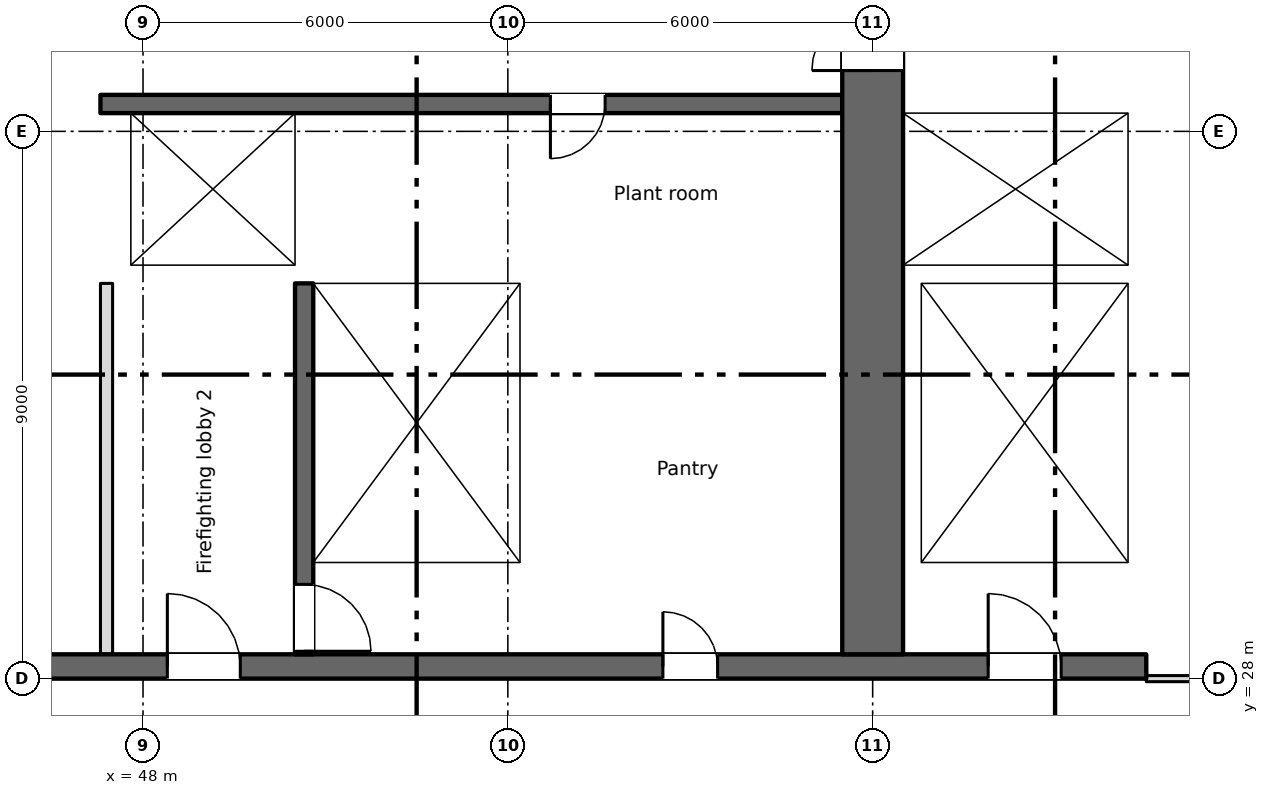
"""IFC4 building model, lengths in metres.
Left out: names, types, materials, properties, quantities, classifications, styles, units other than length and angle.
Written with IfcOpenShell. Run it as: python <this file> out.ifc"""

import sys

from ifc_helpers import new_model, si_unit, direction, frame, frame_2d, origin, place, context, subcontext, project, spatial, rectangle, extrude, element, fill, save


model = new_model("IFC4")
c1 = context("Model", 3, precision=1e-05, world=origin(), true_north=direction((0.0, 1.0)))
c2 = subcontext(c1, "Body", "Model", "MODEL_VIEW")
j1 = project(units=[si_unit("LENGTHUNIT", "METRE"), si_unit("PLANEANGLEUNIT", "RADIAN")], contexts=[c1])
p1 = place(None, origin())
s1 = spatial("IfcSite", under=j1, at=p1, CompositionType="ELEMENT")
p2 = place(p1, origin())
s2 = spatial("IfcBuilding", under=s1, at=p2, CompositionType="ELEMENT")
p3 = place(p2, frame((0.0, 0.0, 22.5)))
s3 = spatial("IfcBuildingStorey", under=s2, at=p3, CompositionType="ELEMENT", Elevation=22.5)
p4 = place(p3, frame((6.7, 28.2, 0.0), z_axis=(0.0, 0.0, 1.0), x_axis=(1.0, 0.0, 0.0)))
e1 = element("IfcWall", 1, at=p4, inside=s3, PredefinedType="SHEAR", context=c2, shape_type="SweptSolid", body=[
    extrude(rectangle(XDim=57.8, YDim=0.4, at=frame_2d((28.9, 0.0))), origin(), (0.0, 0.0, 1.0), 3.35),
])
p5 = place(p4, frame((12.562, 0.0, 0.0)))
e2 = element("IfcOpeningElement", 2, at=p5, cuts=e1, PredefinedType="OPENING", context=c2, shape_type="SweptSolid", body=[
    extrude(rectangle(XDim=0.9, YDim=2.1, at=frame_2d((0.45, 1.05))), frame((0.0, 0.21, 0.0), z_axis=(0.0, -1.0, 0.0), x_axis=(1.0, 0.0, 0.0)), (0.0, 0.0, 1.0), 0.42),
])
p6 = place(p4, frame((15.137, 0.0, 0.0)))
e3 = element("IfcOpeningElement", 3, at=p6, cuts=e1, PredefinedType="OPENING", context=c2, shape_type="SweptSolid", body=[
    extrude(rectangle(XDim=0.9, YDim=2.1, at=frame_2d((0.45, 1.05))), frame((0.0, 0.21, 0.0), z_axis=(0.0, -1.0, 0.0), x_axis=(1.0, 0.0, 0.0)), (0.0, 0.0, 1.0), 0.42),
])
p7 = place(p4, frame((49.85, 0.0, 0.0)))
e4 = element("IfcOpeningElement", 4, at=p7, cuts=e1, PredefinedType="OPENING", context=c2, shape_type="SweptSolid", body=[
    extrude(rectangle(XDim=0.9, YDim=2.1, at=frame_2d((0.45, 1.05))), frame((0.0, 0.21, 0.0), z_axis=(0.0, -1.0, 0.0), x_axis=(1.0, 0.0, 0.0)), (0.0, 0.0, 1.0), 0.42),
])
p8 = place(p4, frame((0.562, 0.0, 0.0)))
e5 = element("IfcOpeningElement", 5, at=p8, cuts=e1, PredefinedType="OPENING", context=c2, shape_type="SweptSolid", body=[
    extrude(rectangle(XDim=0.9, YDim=2.1, at=frame_2d((0.45, 1.05))), frame((0.0, 0.21, 0.0), z_axis=(0.0, -1.0, 0.0), x_axis=(1.0, 0.0, 0.0)), (0.0, 0.0, 1.0), 0.42),
])
p9 = place(p4, frame((2.137, 0.0, 0.0)))
e6 = element("IfcOpeningElement", 6, at=p9, cuts=e1, PredefinedType="OPENING", context=c2, shape_type="SweptSolid", body=[
    extrude(rectangle(XDim=0.9, YDim=2.1, at=frame_2d((0.45, 1.05))), frame((0.0, 0.21, 0.0), z_axis=(0.0, -1.0, 0.0), x_axis=(1.0, 0.0, 0.0)), (0.0, 0.0, 1.0), 0.42),
])
p10 = place(p4, frame((4.7, 0.0, 0.0)))
e7 = element("IfcOpeningElement", 7, at=p10, cuts=e1, PredefinedType="OPENING", context=c2, shape_type="SweptSolid", body=[
    extrude(rectangle(XDim=1.2, YDim=2.1, at=frame_2d((0.6, 1.05))), frame((0.0, 0.21, 0.0), z_axis=(0.0, -1.0, 0.0), x_axis=(1.0, 0.0, 0.0)), (0.0, 0.0, 1.0), 0.42),
])
p11 = place(p4, frame((31.7, 0.0, 0.0)))
e8 = element("IfcOpeningElement", 8, at=p11, cuts=e1, PredefinedType="OPENING", context=c2, shape_type="SweptSolid", body=[
    extrude(rectangle(XDim=1.2, YDim=2.1, at=frame_2d((0.6, 1.05))), frame((0.0, 0.21, 0.0), z_axis=(0.0, -1.0, 0.0), x_axis=(1.0, 0.0, 0.0)), (0.0, 0.0, 1.0), 0.42),
])
p12 = place(p4, frame((55.2, 0.0, 0.0)))
e9 = element("IfcOpeningElement", 9, at=p12, cuts=e1, PredefinedType="OPENING", context=c2, shape_type="SweptSolid", body=[
    extrude(rectangle(XDim=1.2, YDim=2.1, at=frame_2d((0.6, 1.05))), frame((0.0, 0.21, 0.0), z_axis=(0.0, -1.0, 0.0), x_axis=(1.0, 0.0, 0.0)), (0.0, 0.0, 1.0), 0.42),
])
p13 = place(p4, frame((21.7, 0.0, 0.0)))
e10 = element("IfcOpeningElement", 10, at=p13, cuts=e1, PredefinedType="OPENING", context=c2, shape_type="SweptSolid", body=[
    extrude(rectangle(XDim=1.2, YDim=2.1, at=frame_2d((0.6, 1.05))), frame((0.0, 0.21, 0.0), z_axis=(0.0, -1.0, 0.0), x_axis=(1.0, 0.0, 0.0)), (0.0, 0.0, 1.0), 0.42),
])
p14 = place(p4, frame((41.7, 0.0, 0.0)))
e11 = element("IfcOpeningElement", 11, at=p14, cuts=e1, PredefinedType="OPENING", context=c2, shape_type="SweptSolid", body=[
    extrude(rectangle(XDim=1.2, YDim=2.1, at=frame_2d((0.6, 1.05))), frame((0.0, 0.21, 0.0), z_axis=(0.0, -1.0, 0.0), x_axis=(1.0, 0.0, 0.0)), (0.0, 0.0, 1.0), 0.42),
])
p15 = place(p4, frame((24.85, 0.0, 0.0)))
e12 = element("IfcOpeningElement", 12, at=p15, cuts=e1, PredefinedType="OPENING", context=c2, shape_type="SweptSolid", body=[
    extrude(rectangle(XDim=2.4, YDim=2.1, at=frame_2d((1.2, 1.05))), frame((0.0, 0.21, 0.0), z_axis=(0.0, -1.0, 0.0), x_axis=(1.0, 0.0, 0.0)), (0.0, 0.0, 1.0), 0.42),
])
p16 = place(p4, frame((37.35, 0.0, 0.0)))
e13 = element("IfcOpeningElement", 13, at=p16, cuts=e1, PredefinedType="OPENING", context=c2, shape_type="SweptSolid", body=[
    extrude(rectangle(XDim=2.4, YDim=2.1, at=frame_2d((1.2, 1.05))), frame((0.0, 0.21, 0.0), z_axis=(0.0, -1.0, 0.0), x_axis=(1.0, 0.0, 0.0)), (0.0, 0.0, 1.0), 0.42),
])
p17 = place(p4, frame((7.85, 0.0, 0.0)))
e14 = element("IfcOpeningElement", 14, at=p17, cuts=e1, PredefinedType="OPENING", context=c2, shape_type="SweptSolid", body=[
    extrude(rectangle(XDim=2.4, YDim=2.1, at=frame_2d((1.2, 1.05))), frame((0.0, 0.21, 0.0), z_axis=(0.0, -1.0, 0.0), x_axis=(1.0, 0.0, 0.0)), (0.0, 0.0, 1.0), 0.42),
])
p18 = place(p4, frame((28.85, 0.0, 0.0)))
e15 = element("IfcOpeningElement", 15, at=p18, cuts=e1, PredefinedType="OPENING", context=c2, shape_type="SweptSolid", body=[
    extrude(rectangle(XDim=0.9, YDim=2.1, at=frame_2d((0.45, 1.05))), frame((0.0, 0.21, 0.0), z_axis=(0.0, -1.0, 0.0), x_axis=(1.0, 0.0, 0.0)), (0.0, 0.0, 1.0), 0.42),
])
p19 = place(p4, frame((34.85, 0.0, 0.0)))
e16 = element("IfcOpeningElement", 16, at=p19, cuts=e1, PredefinedType="OPENING", context=c2, shape_type="SweptSolid", body=[
    extrude(rectangle(XDim=0.9, YDim=2.1, at=frame_2d((0.45, 1.05))), frame((0.0, 0.21, 0.0), z_axis=(0.0, -1.0, 0.0), x_axis=(1.0, 0.0, 0.0)), (0.0, 0.0, 1.0), 0.42),
])
p20 = place(p3, frame((64.35, 34.8, 0.0), z_axis=(0.0, 0.0, 1.0), x_axis=(0.0, 1.0, 0.0)))
e17 = element("IfcWall", 17, at=p20, inside=s3, PredefinedType="SHEAR", context=c2, shape_type="SweptSolid", body=[
    extrude(rectangle(XDim=10.2, YDim=0.3, at=frame_2d((5.1, 0.0))), origin(), (0.0, 0.0, 1.0), 3.35),
])
p21 = place(p3, frame((60.0, 28.4, 0.0), z_axis=(0.0, 0.0, 1.0), x_axis=(0.0, 1.0, 0.0)))
e18 = element("IfcWall", 18, at=p21, inside=s3, PredefinedType="SHEAR", context=c2, shape_type="SweptSolid", body=[
    extrude(rectangle(XDim=16.6, YDim=1.0, at=frame_2d((8.3, 0.0))), origin(), (0.0, 0.0, 1.0), 3.35),
])
p22 = place(p21, frame((9.6, 0.0, 0.0)))
e19 = element("IfcOpeningElement", 19, at=p22, cuts=e18, PredefinedType="OPENING", context=c2, shape_type="SweptSolid", body=[
    extrude(rectangle(XDim=2.0, YDim=2.1, at=frame_2d((1.0, 1.05))), frame((0.0, 0.51, 0.0), z_axis=(0.0, -1.0, 0.0), x_axis=(1.0, 0.0, 0.0)), (0.0, 0.0, 1.0), 1.02),
])
p23 = place(p21, frame((15.25, 0.0, 0.0)))
e20 = element("IfcOpeningElement", 20, at=p23, cuts=e18, PredefinedType="OPENING", context=c2, shape_type="SweptSolid", body=[
    extrude(rectangle(XDim=1.2, YDim=2.1, at=frame_2d((0.6, 1.05))), frame((0.0, 0.51, 0.0), z_axis=(0.0, -1.0, 0.0), x_axis=(1.0, 0.0, 0.0)), (0.0, 0.0, 1.0), 1.02),
])
p24 = place(p3, frame((50.65, 34.5, 0.0), z_axis=(0.0, 0.0, 1.0), x_axis=(0.0, -1.0, 0.0)))
e21 = element("IfcWall", 21, at=p24, inside=s3, PredefinedType="SHEAR", context=c2, shape_type="SweptSolid", body=[
    extrude(rectangle(XDim=6.1, YDim=0.3, at=frame_2d((3.05, 0.0))), origin(), (0.0, 0.0, 1.0), 3.35),
])
p25 = place(p24, frame((4.95, 0.0, 0.0)))
e22 = element("IfcOpeningElement", 22, at=p25, cuts=e21, PredefinedType="OPENING", context=c2, shape_type="SweptSolid", body=[
    extrude(rectangle(XDim=1.1, YDim=2.1, at=frame_2d((0.55, 1.05))), frame((0.0, 0.16, 0.0), z_axis=(0.0, -1.0, 0.0), x_axis=(1.0, 0.0, 0.0)), (0.0, 0.0, 1.0), 0.32),
])
for number, where, z_axis, x_axis in (
    (23, (54.35, 28.4, 0.0), (0.0, 0.0, 1.0), (0.0, 1.0, 0.0)),
    (24, (60.65, 28.4, 0.0), (0.0, 0.0, 1.0), (0.0, 1.0, 0.0)),
    (25, (64.35, 28.4, 0.0), (0.0, 0.0, 1.0), (0.0, 1.0, 0.0)),
):
    element("IfcWall", number, at=place(p3, frame(where, z_axis=z_axis, x_axis=x_axis)), inside=s3, PredefinedType="SHEAR", context=c2, shape_type="SweptSolid", body=[
        extrude(rectangle(XDim=6.1, YDim=0.3, at=frame_2d((3.05, 0.0))), origin(), (0.0, 0.0, 1.0), 3.35),
    ])
p26 = place(p3, frame((47.3, 34.65, 0.0), z_axis=(0.0, 0.0, 1.0), x_axis=(1.0, 0.0, 0.0)))
e26 = element("IfcWall", 26, at=p26, inside=s3, PredefinedType="SHEAR", context=c2, shape_type="SweptSolid", body=[
    extrude(rectangle(XDim=12.2, YDim=0.3, at=frame_2d((6.1, 0.0))), origin(), (0.0, 0.0, 1.0), 3.35),
])
p27 = place(p26, frame((1.3, 0.0, 0.0)))
e27 = element("IfcOpeningElement", 27, at=p27, cuts=e26, PredefinedType="OPENING", context=c2, shape_type="SweptSolid", body=[
    extrude(rectangle(XDim=1.1, YDim=2.1, at=frame_2d((0.55, 1.05))), frame((0.0, 0.16, 0.0), z_axis=(0.0, -1.0, 0.0), x_axis=(1.0, 0.0, 0.0)), (0.0, 0.0, 1.0), 0.32),
])
p28 = place(p3, frame((60.5, 34.65, 0.0), z_axis=(0.0, 0.0, 1.0), x_axis=(1.0, 0.0, 0.0)))
e28 = element("IfcWall", 28, at=p28, inside=s3, PredefinedType="SHEAR", context=c2, shape_type="SweptSolid", body=[
    extrude(rectangle(XDim=4.0, YDim=0.3, at=frame_2d((2.0, 0.0))), origin(), (0.0, 0.0, 1.0), 3.35),
])
p29 = place(p3, frame((59.5, 37.45, 0.0), z_axis=(0.0, 0.0, 1.0), x_axis=(-1.0, 0.0, 0.0)))
e29 = element("IfcWall", 29, at=p29, inside=s3, PredefinedType="SHEAR", context=c2, shape_type="SweptSolid", body=[
    extrude(rectangle(XDim=12.2, YDim=0.3, at=frame_2d((6.1, 0.0))), origin(), (0.0, 0.0, 1.0), 3.35),
])
p30 = place(p29, frame((3.9, 0.0, 0.0)))
e30 = element("IfcOpeningElement", 30, at=p30, cuts=e29, PredefinedType="OPENING", context=c2, shape_type="SweptSolid", body=[
    extrude(rectangle(XDim=0.9, YDim=2.1, at=frame_2d((0.45, 1.05))), frame((0.0, 0.16, 0.0), z_axis=(0.0, -1.0, 0.0), x_axis=(1.0, 0.0, 0.0)), (0.0, 0.0, 1.0), 0.32),
])
p31 = place(p3, frame((60.5, 37.45, 0.0), z_axis=(0.0, 0.0, 1.0), x_axis=(1.0, 0.0, 0.0)))
e31 = element("IfcWall", 31, at=p31, inside=s3, PredefinedType="SHEAR", context=c2, shape_type="SweptSolid", body=[
    extrude(rectangle(XDim=3.7, YDim=0.3, at=frame_2d((1.85, 0.0))), origin(), (0.0, 0.0, 1.0), 3.35),
])
p32 = place(p31, frame((1.3, 0.0, 0.0)))
e32 = element("IfcOpeningElement", 32, at=p32, cuts=e31, PredefinedType="OPENING", context=c2, shape_type="SweptSolid", body=[
    extrude(rectangle(XDim=1.1, YDim=2.1, at=frame_2d((0.55, 1.05))), frame((0.0, 0.16, 0.0), z_axis=(0.0, -1.0, 0.0), x_axis=(1.0, 0.0, 0.0)), (0.0, 0.0, 1.0), 0.32),
])
p33 = place(p3, frame((47.55, 34.8, 0.0), z_axis=(0.0, 0.0, 1.0), x_axis=(0.0, 1.0, 0.0)))
e33 = element("IfcWall", 33, at=p33, inside=s3, PredefinedType="SHEAR", context=c2, shape_type="SweptSolid", body=[
    extrude(rectangle(XDim=2.5, YDim=0.5, at=frame_2d((1.25, 0.0))), origin(), (0.0, 0.0, 1.0), 3.35),
])
p34 = place(p3, frame((50.65, 34.8, 0.0), z_axis=(0.0, 0.0, 1.0), x_axis=(0.0, 1.0, 0.0)))
e34 = element("IfcWall", 34, at=p34, inside=s3, PredefinedType="SHEAR", context=c2, shape_type="SweptSolid", body=[
    extrude(rectangle(XDim=2.5, YDim=0.3, at=frame_2d((1.25, 0.0))), origin(), (0.0, 0.0, 1.0), 3.35),
])
p35 = place(p3, frame((47.4, 28.4, 0.0), z_axis=(0.0, 0.0, 1.0), x_axis=(0.0, 1.0, 0.0)))
e35 = element("IfcWall", 35, at=p35, inside=s3, PredefinedType="PARTITIONING", context=c2, shape_type="SweptSolid", body=[
    extrude(rectangle(XDim=6.1, YDim=0.2, at=frame_2d((3.05, 0.0))), origin(), (0.0, 0.0, 1.0), 3.35),
])
p36 = place(p3, frame((64.5, 28.0, 0.0), z_axis=(0.0, 0.0, 1.0), x_axis=(1.0, 0.0, 0.0)))
e36 = element("IfcWall", 36, at=p36, inside=s3, PredefinedType="PARTITIONING", context=c2, shape_type="SweptSolid", body=[
    extrude(rectangle(XDim=12.7, YDim=0.1, at=frame_2d((6.35, 0.0))), origin(), (0.0, 0.0, 1.0), 3.35),
])
p37 = place(p36, frame((7.475, 0.0, 0.0)))
e37 = element("IfcOpeningElement", 37, at=p37, cuts=e36, PredefinedType="OPENING", context=c2, shape_type="SweptSolid", body=[
    extrude(rectangle(XDim=1.8, YDim=2.1, at=frame_2d((0.9, 1.05))), frame((0.0, 0.06, 0.0), z_axis=(0.0, -1.0, 0.0), x_axis=(1.0, 0.0, 0.0)), (0.0, 0.0, 1.0), 0.12),
])
p38 = place(p36, frame((1.525, 0.0, 0.0)))
e38 = element("IfcOpeningElement", 38, at=p38, cuts=e36, PredefinedType="OPENING", context=c2, shape_type="SweptSolid", body=[
    extrude(rectangle(XDim=1.0, YDim=2.1, at=frame_2d((0.5, 1.05))), frame((0.0, 0.06, 0.0), z_axis=(0.0, -1.0, 0.0), x_axis=(1.0, 0.0, 0.0)), (0.0, 0.0, 1.0), 0.12),
])
p39 = place(p7, origin())
e39 = element("IfcDoor", 39, at=p39, inside=s3, OperationType="SINGLE_SWING_LEFT", PredefinedType="DOOR", context=c2, shape_type="SweptSolid", body=[
    extrude(rectangle(XDim=0.9, YDim=2.1, at=frame_2d((0.45, 1.05))), frame((0.0, 0.025, 0.0), z_axis=(0.0, -1.0, 0.0), x_axis=(1.0, 0.0, 0.0)), (0.0, 0.0, 1.0), 0.05),
])
fill(e4, e39)
p40 = place(p30, origin())
e40 = element("IfcDoor", 40, at=p40, inside=s3, OperationType="SINGLE_SWING_RIGHT", PredefinedType="DOOR", context=c2, shape_type="SweptSolid", body=[
    extrude(rectangle(XDim=0.9, YDim=2.1, at=frame_2d((0.45, 1.05))), frame((0.0, 0.025, 0.0), z_axis=(0.0, -1.0, 0.0), x_axis=(1.0, 0.0, 0.0)), (0.0, 0.0, 1.0), 0.05),
])
fill(e30, e40)
p41 = place(p32, origin())
e41 = element("IfcDoor", 41, at=p41, inside=s3, OperationType="SLIDING_TO_LEFT", PredefinedType="DOOR", context=c2, shape_type="SweptSolid", body=[
    extrude(rectangle(XDim=1.1, YDim=2.1, at=frame_2d((0.55, 1.05))), frame((0.0, 0.025, 0.0), z_axis=(0.0, -1.0, 0.0), x_axis=(1.0, 0.0, 0.0)), (0.0, 0.0, 1.0), 0.05),
])
fill(e32, e41)
p42 = place(p27, origin())
e42 = element("IfcDoor", 42, at=p42, inside=s3, OperationType="SLIDING_TO_LEFT", PredefinedType="DOOR", context=c2, shape_type="SweptSolid", body=[
    extrude(rectangle(XDim=1.1, YDim=2.1, at=frame_2d((0.55, 1.05))), frame((0.0, 0.025, 0.0), z_axis=(0.0, -1.0, 0.0), x_axis=(1.0, 0.0, 0.0)), (0.0, 0.0, 1.0), 0.05),
])
fill(e27, e42)
p43 = place(p25, origin())
e43 = element("IfcDoor", 43, at=p43, inside=s3, OperationType="SINGLE_SWING_RIGHT", PredefinedType="DOOR", context=c2, shape_type="SweptSolid", body=[
    extrude(rectangle(XDim=1.1, YDim=2.1, at=frame_2d((0.55, 1.05))), frame((0.0, 0.025, 0.0), z_axis=(0.0, -1.0, 0.0), x_axis=(1.0, 0.0, 0.0)), (0.0, 0.0, 1.0), 0.05),
])
fill(e22, e43)
p44 = place(p12, origin())
e44 = element("IfcDoor", 44, at=p44, inside=s3, OperationType="SINGLE_SWING_LEFT", PredefinedType="DOOR", context=c2, shape_type="SweptSolid", body=[
    extrude(rectangle(XDim=1.2, YDim=2.1, at=frame_2d((0.6, 1.05))), frame((0.0, 0.025, 0.0), z_axis=(0.0, -1.0, 0.0), x_axis=(1.0, 0.0, 0.0)), (0.0, 0.0, 1.0), 0.05),
])
fill(e9, e44)
p45 = place(p14, origin())
e45 = element("IfcDoor", 45, at=p45, inside=s3, OperationType="SINGLE_SWING_LEFT", PredefinedType="DOOR", context=c2, shape_type="SweptSolid", body=[
    extrude(rectangle(XDim=1.2, YDim=2.1, at=frame_2d((0.6, 1.05))), frame((0.0, 0.025, 0.0), z_axis=(0.0, -1.0, 0.0), x_axis=(1.0, 0.0, 0.0)), (0.0, 0.0, 1.0), 0.05),
])
fill(e11, e45)
p46 = place(p22, origin())
e46 = element("IfcDoor", 46, at=p46, inside=s3, OperationType="DOUBLE_DOOR_SINGLE_SWING", PredefinedType="DOOR", context=c2, shape_type="SweptSolid", body=[
    extrude(rectangle(XDim=2.0, YDim=2.1, at=frame_2d((1.0, 1.05))), frame((0.0, 0.025, 0.0), z_axis=(0.0, -1.0, 0.0), x_axis=(1.0, 0.0, 0.0)), (0.0, 0.0, 1.0), 0.05),
])
fill(e19, e46)
save(model, sys.argv[1])
